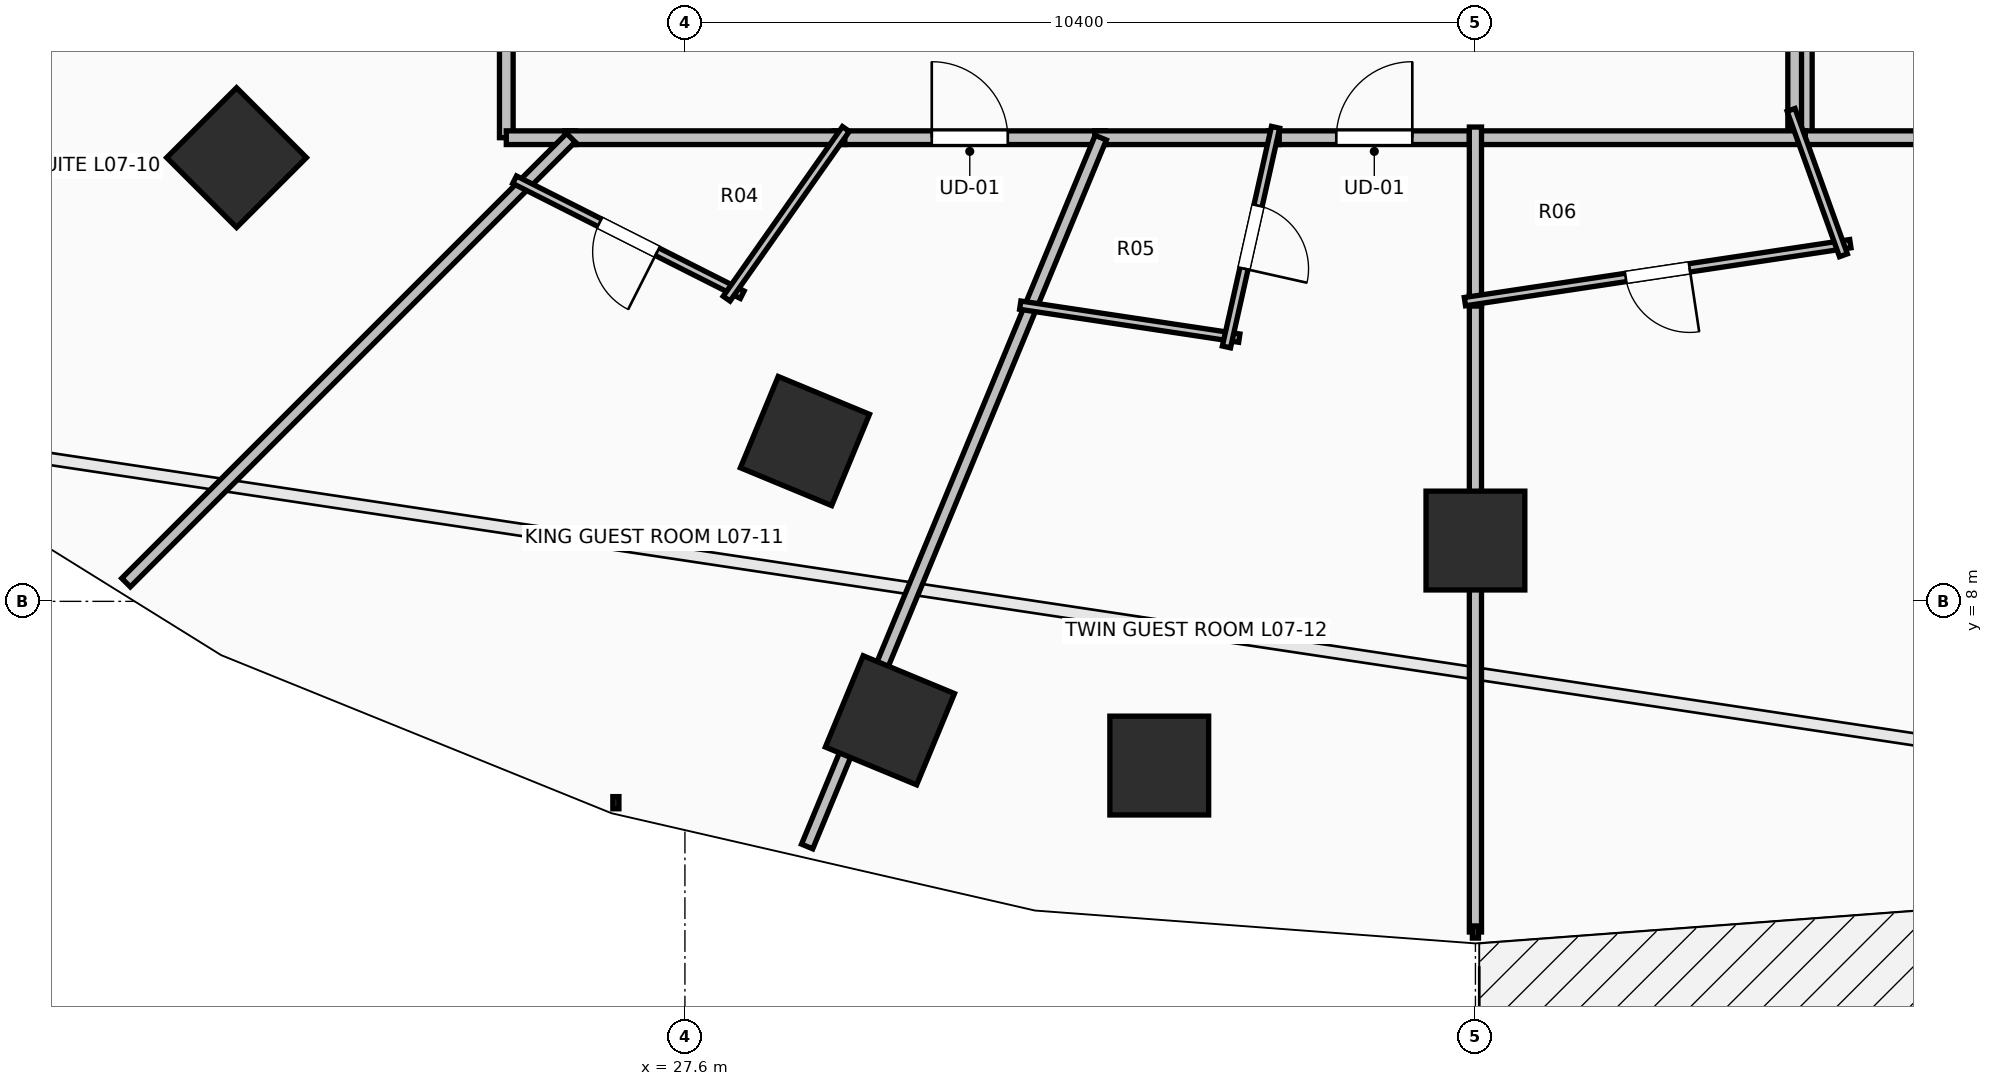
"""IFC4 building model, lengths in metres.
Left out: names, types, materials, properties, quantities, classifications, styles, units other than length and angle.
Written with IfcOpenShell. Run it as: python <this file> out.ifc"""

import sys

from ifc_helpers import new_model, si_unit, direction, frame, frame_2d, origin, origin_2d, place, context, subcontext, project, spatial, rectangle, extrude, element, fill, save


model = new_model("IFC4")
c1 = context("Model", 3, precision=1e-05, world=origin(), true_north=direction((0.0, 1.0)))
c2 = subcontext(c1, "Body", "Model", "MODEL_VIEW")
j1 = project(units=[si_unit("LENGTHUNIT", "METRE"), si_unit("PLANEANGLEUNIT", "RADIAN")], contexts=[c1])
p1 = place(None, origin())
s1 = spatial("IfcSite", under=j1, at=p1, CompositionType="ELEMENT")
p2 = place(p1, origin())
s2 = spatial("IfcBuilding", under=s1, at=p2, CompositionType="ELEMENT")
p3 = place(p2, frame((0.0, 0.0, 31.0)))
s3 = spatial("IfcBuildingStorey", under=s2, at=p3, CompositionType="ELEMENT", Elevation=31.0)
for number, where, z_axis, x_axis in (
    (1, (21.701, 13.838, 0.0), (0.0, 0.0, 1.0), (-0.707, -0.707, 0.0)),
    (2, (29.179, 10.109, 0.0), (0.0, 0.0, 1.0), (-0.383, -0.924, 0.0)),
    (3, (38.0, 8.8, 0.0), (0.0, 0.0, 1.0), (0.0, -1.0, 0.0)),
    (4, (30.297, 6.435, 0.0), (0.0, 0.0, 1.0), (-0.383, -0.924, 0.0)),
    (5, (33.84, 5.84, 0.0), (0.0, 0.0, 1.0), (0.0, -1.0, 0.0)),
):
    element("IfcColumn", number, at=place(p3, frame(where, z_axis=z_axis, x_axis=x_axis)), inside=s3, PredefinedType="COLUMN", context=c2, shape_type="SweptSolid", body=[
        extrude(rectangle(XDim=1.3, YDim=1.3, at=origin_2d()), origin(), (0.0, 0.0, 1.0), 3.5),
    ])
p4 = place(p3, frame((25.25, 17.969, 0.0), z_axis=(0.0, 0.0, 1.0), x_axis=(0.0, -1.0, 0.0)))
e6 = element("IfcWall", 6, at=p4, inside=s3, PredefinedType="PARTITIONING", context=c2, shape_type="SweptSolid", body=[
    extrude(rectangle(XDim=3.869, YDim=0.18, at=frame_2d((1.935, 0.0))), origin(), (0.0, 0.0, 1.0), 2.432),
])
p5 = place(p4, frame((1.409, 0.0, 0.0)))
e7 = element("IfcOpeningElement", 7, at=p5, cuts=e6, PredefinedType="OPENING", context=c2, shape_type="SweptSolid", body=[
    extrude(rectangle(XDim=1.05, YDim=2.2, at=frame_2d((0.525, 1.1))), frame((0.0, 0.105, 0.0), z_axis=(0.0, -1.0, 0.0), x_axis=(1.0, 0.0, 0.0)), (0.0, 0.0, 1.0), 0.21),
])
p6 = place(p3, frame((25.25, 14.1, 0.0), z_axis=(0.0, 0.0, 1.0), x_axis=(1.0, 0.0, 0.0)))
e8 = element("IfcWall", 8, at=p6, inside=s3, PredefinedType="PARTITIONING", context=c2, shape_type="SweptSolid", body=[
    extrude(rectangle(XDim=0.91, YDim=0.18, at=frame_2d((0.455, 0.0))), origin(), (0.0, 0.0, 1.0), 3.24),
])
p7 = place(p3, frame((29.564, 14.1, 0.0), z_axis=(0.0, 0.0, 1.0), x_axis=(1.0, 0.0, 0.0)))
e9 = element("IfcWall", 9, at=p7, inside=s3, PredefinedType="PARTITIONING", context=c2, shape_type="SweptSolid", body=[
    extrude(rectangle(XDim=3.567, YDim=0.18, at=frame_2d((1.784, 0.0))), origin(), (0.0, 0.0, 1.0), 3.24),
])
p8 = place(p7, frame((1.283, 0.0, 0.0)))
e10 = element("IfcOpeningElement", 10, at=p8, cuts=e9, PredefinedType="OPENING", context=c2, shape_type="SweptSolid", body=[
    extrude(rectangle(XDim=1.0, YDim=2.15, at=frame_2d((0.5, 1.075))), frame((0.0, 0.105, 0.0), z_axis=(0.0, -1.0, 0.0), x_axis=(1.0, 0.0, 0.0)), (0.0, 0.0, 1.0), 0.21),
])
p9 = place(p3, frame((26.02, 14.1, 0.0), z_axis=(0.0, 0.0, 1.0), x_axis=(1.0, 0.0, 0.0)))
e11 = element("IfcWall", 11, at=p9, inside=s3, PredefinedType="PARTITIONING", context=c2, shape_type="SweptSolid", body=[
    extrude(rectangle(XDim=3.684, YDim=0.18, at=frame_2d((1.842, 0.0))), origin(), (0.0, 0.0, 1.0), 2.432),
])
p10 = place(p3, frame((35.279, 14.1, 0.0), z_axis=(0.0, 0.0, 1.0), x_axis=(1.0, 0.0, 0.0)))
e12 = element("IfcWall", 12, at=p10, inside=s3, PredefinedType="PARTITIONING", context=c2, shape_type="SweptSolid", body=[
    extrude(rectangle(XDim=2.781, YDim=0.18, at=frame_2d((1.391, 0.0))), origin(), (0.0, 0.0, 1.0), 3.24),
])
p11 = place(p10, frame((0.89, 0.0, 0.0)))
e13 = element("IfcOpeningElement", 13, at=p11, cuts=e12, PredefinedType="OPENING", context=c2, shape_type="SweptSolid", body=[
    extrude(rectangle(XDim=1.0, YDim=2.15, at=frame_2d((0.5, 1.075))), frame((0.0, 0.105, 0.0), z_axis=(0.0, -1.0, 0.0), x_axis=(1.0, 0.0, 0.0)), (0.0, 0.0, 1.0), 0.21),
])
p12 = place(p3, frame((32.991, 14.1, 0.0), z_axis=(0.0, 0.0, 1.0), x_axis=(1.0, 0.0, 0.0)))
e14 = element("IfcWall", 14, at=p12, inside=s3, PredefinedType="PARTITIONING", context=c2, shape_type="SweptSolid", body=[
    extrude(rectangle(XDim=2.428, YDim=0.18, at=frame_2d((1.214, 0.0))), origin(), (0.0, 0.0, 1.0), 3.24),
])
p13 = place(p3, frame((42.34, 16.24, 0.0), z_axis=(0.0, 0.0, 1.0), x_axis=(0.0, -1.0, 0.0)))
e15 = element("IfcWall", 15, at=p13, inside=s3, PredefinedType="PARTITIONING", context=c2, shape_type="SweptSolid", body=[
    extrude(rectangle(XDim=2.14, YDim=0.18, at=frame_2d((1.07, 0.0))), origin(), (0.0, 0.0, 1.0), 3.24),
])
p14 = place(p3, frame((42.34, 14.1, 0.0), z_axis=(0.0, 0.0, 1.0), x_axis=(1.0, 0.0, 0.0)))
e16 = element("IfcWall", 16, at=p14, inside=s3, PredefinedType="PARTITIONING", context=c2, shape_type="SweptSolid", body=[
    extrude(rectangle(XDim=7.645, YDim=0.18, at=frame_2d((3.823, 0.0))), origin(), (0.0, 0.0, 1.0), 2.432),
])
p15 = place(p14, frame((3.298, 0.0, 0.0)))
e17 = element("IfcOpeningElement", 17, at=p15, cuts=e16, PredefinedType="OPENING", context=c2, shape_type="SweptSolid", body=[
    extrude(rectangle(XDim=1.05, YDim=2.2, at=frame_2d((0.525, 1.1))), frame((0.0, 0.105, 0.0), z_axis=(0.0, -1.0, 0.0), x_axis=(1.0, 0.0, 0.0)), (0.0, 0.0, 1.0), 0.21),
])
p16 = place(p3, frame((42.2, 14.157, 0.0), z_axis=(0.0, 0.0, 1.0), x_axis=(0.0, 1.0, 0.0)))
e18 = element("IfcWall", 18, at=p16, inside=s3, PredefinedType="PARTITIONING", context=c2, shape_type="SweptSolid", body=[
    extrude(rectangle(XDim=2.083, YDim=0.18, at=frame_2d((1.042, 0.0))), origin(), (0.0, 0.0, 1.0), 3.24),
])
p17 = place(p3, frame((37.92, 14.1, 0.0), z_axis=(0.0, 0.0, 1.0), x_axis=(1.0, 0.0, 0.0)))
e19 = element("IfcWall", 19, at=p17, inside=s3, PredefinedType="PARTITIONING", context=c2, shape_type="SweptSolid", body=[
    extrude(rectangle(XDim=4.42, YDim=0.18, at=frame_2d((2.21, 0.0))), origin(), (0.0, 0.0, 1.0), 3.24),
])
p18 = place(p3, frame((20.247, 8.247, 0.0), z_axis=(0.0, 0.0, 1.0), x_axis=(0.707106781187, 0.707106781187, 0.0)))
e20 = element("IfcWall", 20, at=p18, inside=s3, PredefinedType="PARTITIONING", context=c2, shape_type="SweptSolid", body=[
    extrude(rectangle(XDim=8.277, YDim=0.16, at=frame_2d((4.139, 0.0))), origin(), (0.0, 0.0, 1.0), 2.624),
])
p19 = place(p3, frame((28.354, 12.034, 0.0), z_axis=(0.0, 0.0, 1.0), x_axis=(-0.892556909034, 0.450934767052, 0.0)))
e21 = element("IfcWall", 21, at=p19, inside=s3, PredefinedType="PARTITIONING", context=c2, shape_type="SweptSolid", body=[
    extrude(rectangle(XDim=3.356, YDim=0.11, at=frame_2d((1.678, 0.0))), origin(), (0.0, 0.0, 1.0), 2.432),
])
p20 = place(p19, frame((1.253, 0.0, 0.0)))
e22 = element("IfcOpeningElement", 22, at=p20, cuts=e21, PredefinedType="OPENING", context=c2, shape_type="SweptSolid", body=[
    extrude(rectangle(XDim=0.85, YDim=2.1, at=frame_2d((0.425, 1.05))), frame((0.0, 0.07, 0.0), z_axis=(0.0, -1.0, 0.0), x_axis=(1.0, 0.0, 0.0)), (0.0, 0.0, 1.0), 0.14),
])
p21 = place(p3, frame((29.718, 14.215, 0.0), z_axis=(0.0, 0.0, 1.0), x_axis=(-0.575076641985, -0.81809953908, 0.0)))
e23 = element("IfcWall", 23, at=p21, inside=s3, PredefinedType="PARTITIONING", context=c2, shape_type="SweptSolid", body=[
    extrude(rectangle(XDim=2.729, YDim=0.11, at=frame_2d((1.364, 0.0))), origin(), (0.0, 0.0, 1.0), 2.432),
])
p22 = place(p3, frame((29.208, 4.775, 0.0), z_axis=(0.0, 0.0, 1.0), x_axis=(0.382718503749, 0.923865004689, 0.0)))
e24 = element("IfcWall", 24, at=p22, inside=s3, PredefinedType="PARTITIONING", context=c2, shape_type="SweptSolid", body=[
    extrude(rectangle(XDim=10.094, YDim=0.16, at=frame_2d((5.047, 0.0))), origin(), (0.0, 0.0, 1.0), 2.432),
])
p23 = place(p3, frame((34.893, 11.463, 0.0), z_axis=(0.0, 0.0, 1.0), x_axis=(-0.988868035357, 0.148795190273, 0.0)))
e25 = element("IfcWall", 25, at=p23, inside=s3, PredefinedType="PARTITIONING", context=c2, shape_type="SweptSolid", body=[
    extrude(rectangle(XDim=2.914, YDim=0.11, at=frame_2d((1.457, 0.0))), origin(), (0.0, 0.0, 1.0), 3.24),
])
p24 = place(p3, frame((35.371, 14.237, 0.0), z_axis=(0.0, 0.0, 1.0), x_axis=(-0.218283637967, -0.975885368983, 0.0)))
e26 = element("IfcWall", 26, at=p24, inside=s3, PredefinedType="PARTITIONING", context=c2, shape_type="SweptSolid", body=[
    extrude(rectangle(XDim=2.96, YDim=0.11, at=frame_2d((1.48, 0.0))), origin(), (0.0, 0.0, 1.0), 2.922),
])
p25 = place(p24, frame((1.055, 0.0, 0.0)))
e27 = element("IfcOpeningElement", 27, at=p25, cuts=e26, PredefinedType="OPENING", context=c2, shape_type="SweptSolid", body=[
    extrude(rectangle(XDim=0.85, YDim=2.1, at=frame_2d((0.425, 1.05))), frame((0.0, 0.07, 0.0), z_axis=(0.0, -1.0, 0.0), x_axis=(1.0, 0.0, 0.0)), (0.0, 0.0, 1.0), 0.14),
])
p26 = place(p3, frame((38.0, 3.65, 0.0), z_axis=(0.0, 0.0, 1.0), x_axis=(0.0, 1.0, 0.0)))
e28 = element("IfcWall", 28, at=p26, inside=s3, PredefinedType="PARTITIONING", context=c2, shape_type="SweptSolid", body=[
    extrude(rectangle(XDim=8.375, YDim=0.16, at=frame_2d((4.188, 0.0))), origin(), (0.0, 0.0, 1.0), 2.432),
])
p27 = place(p3, frame((38.0, 11.885, 0.0), z_axis=(0.0, 0.0, 1.0), x_axis=(0.0, 1.0, 0.0)))
e29 = element("IfcWall", 29, at=p27, inside=s3, PredefinedType="PARTITIONING", context=c2, shape_type="SweptSolid", body=[
    extrude(rectangle(XDim=2.355, YDim=0.16, at=frame_2d((1.177, 0.0))), origin(), (0.0, 0.0, 1.0), 2.922),
])
p28 = place(p3, frame((42.932, 12.706, 0.0), z_axis=(0.0, 0.0, 1.0), x_axis=(-0.988876905643, -0.148736227888, 0.0)))
e30 = element("IfcWall", 30, at=p28, inside=s3, PredefinedType="PARTITIONING", context=c2, shape_type="SweptSolid", body=[
    extrude(rectangle(XDim=5.128, YDim=0.11, at=frame_2d((2.564, 0.0))), origin(), (0.0, 0.0, 1.0), 3.24),
])
p29 = place(p28, frame((2.139, 0.0, 0.0)))
e31 = element("IfcOpeningElement", 31, at=p29, cuts=e30, PredefinedType="OPENING", context=c2, shape_type="SweptSolid", body=[
    extrude(rectangle(XDim=0.85, YDim=2.1, at=frame_2d((0.425, 1.05))), frame((0.0, 0.07, 0.0), z_axis=(0.0, -1.0, 0.0), x_axis=(1.0, 0.0, 0.0)), (0.0, 0.0, 1.0), 0.14),
])
p30 = place(p3, frame((42.153, 14.466, 0.0), z_axis=(0.0, 0.0, 1.0), x_axis=(0.338800270412, -0.940858319179, 0.0)))
e32 = element("IfcWall", 32, at=p30, inside=s3, PredefinedType="PARTITIONING", context=c2, shape_type="SweptSolid", body=[
    extrude(rectangle(XDim=2.033, YDim=0.11, at=frame_2d((1.016, 0.0))), origin(), (0.0, 0.0, 1.0), 2.432),
])
p31 = place(p8, origin())
e33 = element("IfcDoor", 33, at=p31, inside=s3, OperationType="SINGLE_SWING_LEFT", PredefinedType="DOOR", context=c2, shape_type="SweptSolid", body=[
    extrude(rectangle(XDim=1.0, YDim=2.15, at=frame_2d((0.5, 1.075))), frame((0.0, 0.025, 0.0), z_axis=(0.0, -1.0, 0.0), x_axis=(1.0, 0.0, 0.0)), (0.0, 0.0, 1.0), 0.05),
])
fill(e10, e33)
p32 = place(p11, origin())
e34 = element("IfcDoor", 34, at=p32, inside=s3, OperationType="SINGLE_SWING_RIGHT", PredefinedType="DOOR", context=c2, shape_type="SweptSolid", body=[
    extrude(rectangle(XDim=1.0, YDim=2.15, at=frame_2d((0.5, 1.075))), frame((0.0, 0.025, 0.0), z_axis=(0.0, -1.0, 0.0), x_axis=(1.0, 0.0, 0.0)), (0.0, 0.0, 1.0), 0.05),
])
fill(e13, e34)
p33 = place(p20, origin())
e35 = element("IfcDoor", 35, at=p33, inside=s3, OperationType="SINGLE_SWING_LEFT", PredefinedType="DOOR", context=c2, shape_type="SweptSolid", body=[
    extrude(rectangle(XDim=0.85, YDim=2.1, at=frame_2d((0.425, 1.05))), frame((0.0, 0.025, 0.0), z_axis=(0.0, -1.0, 0.0), x_axis=(1.0, 0.0, 0.0)), (0.0, 0.0, 1.0), 0.05),
])
fill(e22, e35)
p34 = place(p25, origin())
e36 = element("IfcDoor", 36, at=p34, inside=s3, OperationType="SINGLE_SWING_RIGHT", PredefinedType="DOOR", context=c2, shape_type="SweptSolid", body=[
    extrude(rectangle(XDim=0.85, YDim=2.1, at=frame_2d((0.425, 1.05))), frame((0.0, 0.025, 0.0), z_axis=(0.0, -1.0, 0.0), x_axis=(1.0, 0.0, 0.0)), (0.0, 0.0, 1.0), 0.05),
])
fill(e27, e36)
p35 = place(p29, origin())
e37 = element("IfcDoor", 37, at=p35, inside=s3, OperationType="SINGLE_SWING_LEFT", PredefinedType="DOOR", context=c2, shape_type="SweptSolid", body=[
    extrude(rectangle(XDim=0.85, YDim=2.1, at=frame_2d((0.425, 1.05))), frame((0.0, 0.025, 0.0), z_axis=(0.0, -1.0, 0.0), x_axis=(1.0, 0.0, 0.0)), (0.0, 0.0, 1.0), 0.05),
])
fill(e31, e37)
save(model, sys.argv[1])
